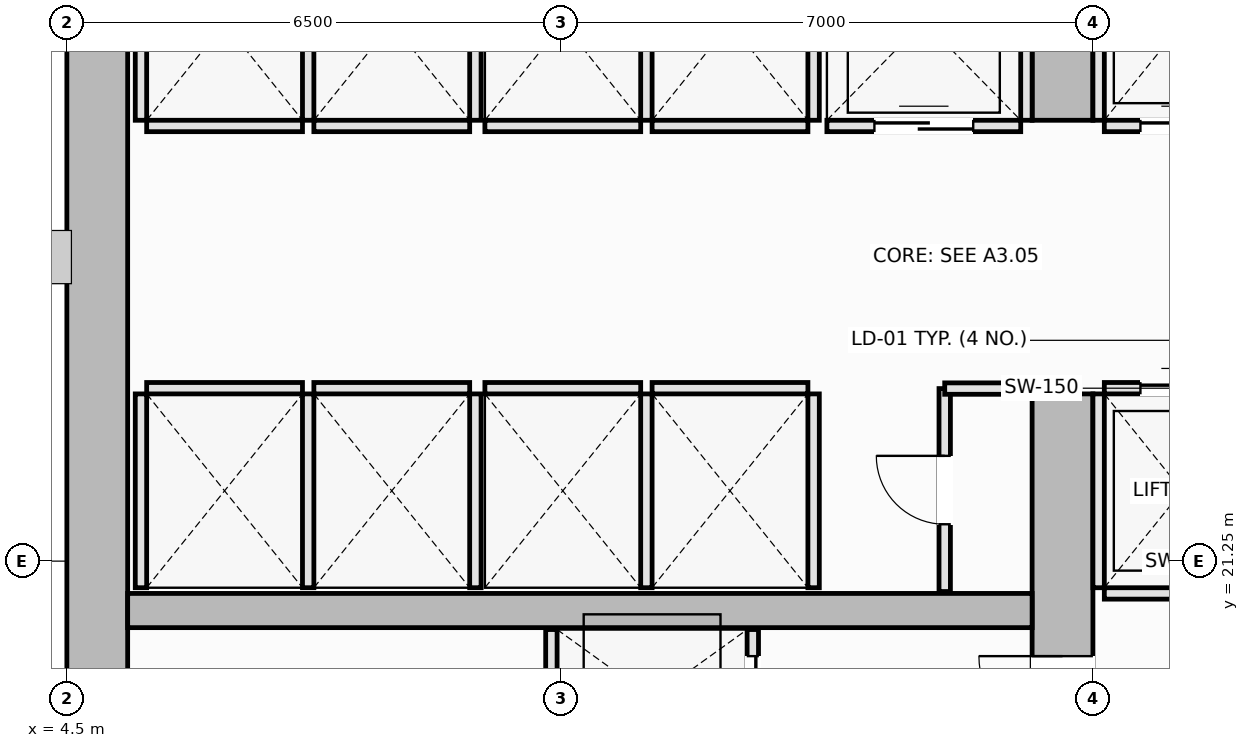
"""IFC4 building model, lengths in metres.
Left out: names, types, materials, properties, quantities, classifications, styles, units other than length and angle.
Written with IfcOpenShell. Run it as: python <this file> out.ifc"""

import sys

from ifc_helpers import new_model, si_unit, direction, frame, frame_2d, origin, place, context, subcontext, project, spatial, rectangle, extrude, element, fill, save


model = new_model("IFC4")
c1 = context("Model", 3, precision=1e-05, world=origin(), true_north=direction((0.0, 1.0)))
c2 = subcontext(c1, "Body", "Model", "MODEL_VIEW")
j1 = project(units=[si_unit("LENGTHUNIT", "METRE"), si_unit("PLANEANGLEUNIT", "RADIAN")], contexts=[c1])
p1 = place(None, origin())
s1 = spatial("IfcSite", under=j1, at=p1, CompositionType="ELEMENT")
p2 = place(p1, origin())
s2 = spatial("IfcBuilding", under=s1, at=p2, CompositionType="ELEMENT")
p3 = place(p2, frame((0.0, 0.0, 54.0)))
s3 = spatial("IfcBuildingStorey", under=s2, at=p3, CompositionType="ELEMENT", Elevation=54.0)
p4 = place(p3, frame((4.9, 14.8, 0.0), z_axis=(0.0, 0.0, 1.0), x_axis=(0.0, 1.0, 0.0)))
e1 = element("IfcWall", 1, at=p4, inside=s3, PredefinedType="SHEAR", context=c2, shape_type="SweptSolid", body=[
    extrude(rectangle(XDim=20.9, YDim=0.8, at=frame_2d((10.45, 0.0))), origin(), (0.0, 0.0, 1.0), 3.55),
])
p5 = place(p3, frame((17.6, 14.8, 0.0), z_axis=(0.0, 0.0, 1.0), x_axis=(0.0, 1.0, 0.0)))
e2 = element("IfcWall", 2, at=p5, inside=s3, PredefinedType="SHEAR", context=c2, shape_type="SweptSolid", body=[
    extrude(rectangle(XDim=8.65, YDim=0.8, at=frame_2d((4.325, 0.0))), origin(), (0.0, 0.0, 1.0), 3.55),
])
p6 = place(p5, frame((4.1, 0.0, 0.0)))
e3 = element("IfcOpeningElement", 3, at=p6, cuts=e2, PredefinedType="OPENING", context=c2, shape_type="SweptSolid", body=[
    extrude(rectangle(XDim=1.1, YDim=2.15, at=frame_2d((0.55, 1.075))), frame((0.0, 0.41, 0.0), z_axis=(0.0, -1.0, 0.0), x_axis=(1.0, 0.0, 0.0)), (0.0, 0.0, 1.0), 0.82),
])
p7 = place(p3, frame((17.6, 27.05, 0.0), z_axis=(0.0, 0.0, 1.0), x_axis=(0.0, 1.0, 0.0)))
e4 = element("IfcWall", 4, at=p7, inside=s3, PredefinedType="SHEAR", context=c2, shape_type="SweptSolid", body=[
    extrude(rectangle(XDim=8.65, YDim=0.8, at=frame_2d((4.325, 0.0))), origin(), (0.0, 0.0, 1.0), 3.55),
])
p8 = place(p7, frame((3.45, 0.0, 0.0)))
e5 = element("IfcOpeningElement", 5, at=p8, cuts=e4, PredefinedType="OPENING", context=c2, shape_type="SweptSolid", body=[
    extrude(rectangle(XDim=1.1, YDim=2.15, at=frame_2d((0.55, 1.075))), frame((0.0, 0.41, 0.0), z_axis=(0.0, -1.0, 0.0), x_axis=(1.0, 0.0, 0.0)), (0.0, 0.0, 1.0), 0.82),
])
p9 = place(p3, frame((5.3, 20.6, 0.0), z_axis=(0.0, 0.0, 1.0), x_axis=(1.0, 0.0, 0.0)))
e6 = element("IfcWall", 6, at=p9, inside=s3, PredefinedType="SHEAR", context=c2, shape_type="SweptSolid", body=[
    extrude(rectangle(XDim=11.9, YDim=0.45, at=frame_2d((5.95, 0.0))), origin(), (0.0, 0.0, 1.0), 3.55),
])
p10 = place(p3, frame((18.15, 20.825, 0.0), z_axis=(0.0, 0.0, 1.0), x_axis=(1.0, 0.0, 0.0)))
e7 = element("IfcWall", 7, at=p10, inside=s3, PredefinedType="PARTITIONING", context=c2, shape_type="SweptSolid", body=[
    extrude(rectangle(XDim=2.05, YDim=0.15, at=frame_2d((1.025, 0.0))), origin(), (0.0, 0.0, 1.0), 3.37),
])
p11 = place(p3, frame((18.15, 23.525, 0.0), z_axis=(0.0, 0.0, 1.0), x_axis=(1.0, 0.0, 0.0)))
e8 = element("IfcWall", 8, at=p11, inside=s3, PredefinedType="PARTITIONING", context=c2, shape_type="SweptSolid", body=[
    extrude(rectangle(XDim=2.05, YDim=0.15, at=frame_2d((1.025, 0.0))), origin(), (0.0, 0.0, 1.0), 3.37),
])
p12 = place(p11, frame((0.475, 0.0, 0.0)))
e9 = element("IfcOpeningElement", 9, at=p12, cuts=e8, PredefinedType="OPENING", context=c2, shape_type="SweptSolid", body=[
    extrude(rectangle(XDim=1.1, YDim=2.2, at=frame_2d((0.55, 1.1))), frame((0.0, 0.085, 0.0), z_axis=(0.0, -1.0, 0.0), x_axis=(1.0, 0.0, 0.0)), (0.0, 0.0, 1.0), 0.17),
])
p13 = place(p3, frame((18.075, 20.9, 0.0), z_axis=(0.0, 0.0, 1.0), x_axis=(0.0, 1.0, 0.0)))
e10 = element("IfcWall", 10, at=p13, inside=s3, PredefinedType="PARTITIONING", context=c2, shape_type="SweptSolid", body=[
    extrude(rectangle(XDim=2.55, YDim=0.15, at=frame_2d((1.275, 0.0))), origin(), (0.0, 0.0, 1.0), 3.37),
])
p14 = place(p3, frame((18.15, 26.975, 0.0), z_axis=(0.0, 0.0, 1.0), x_axis=(1.0, 0.0, 0.0)))
e11 = element("IfcWall", 11, at=p14, inside=s3, PredefinedType="PARTITIONING", context=c2, shape_type="SweptSolid", body=[
    extrude(rectangle(XDim=2.05, YDim=0.15, at=frame_2d((1.025, 0.0))), origin(), (0.0, 0.0, 1.0), 3.37),
])
p15 = place(p14, frame((0.475, 0.0, 0.0)))
e12 = element("IfcOpeningElement", 12, at=p15, cuts=e11, PredefinedType="OPENING", context=c2, shape_type="SweptSolid", body=[
    extrude(rectangle(XDim=1.1, YDim=2.2, at=frame_2d((0.55, 1.1))), frame((0.0, 0.085, 0.0), z_axis=(0.0, -1.0, 0.0), x_axis=(1.0, 0.0, 0.0)), (0.0, 0.0, 1.0), 0.17),
])
p16 = place(p3, frame((18.075, 27.05, 0.0), z_axis=(0.0, 0.0, 1.0), x_axis=(0.0, 1.0, 0.0)))
e13 = element("IfcWall", 13, at=p16, inside=s3, PredefinedType="PARTITIONING", context=c2, shape_type="SweptSolid", body=[
    extrude(rectangle(XDim=2.55, YDim=0.15, at=frame_2d((1.275, 0.0))), origin(), (0.0, 0.0, 1.0), 3.37),
])
p17 = place(p3, frame((5.55, 23.525, 0.0), z_axis=(0.0, 0.0, 1.0), x_axis=(1.0, 0.0, 0.0)))
e14 = element("IfcWall", 14, at=p17, inside=s3, PredefinedType="PARTITIONING", context=c2, shape_type="SweptSolid", body=[
    extrude(rectangle(XDim=2.05, YDim=0.15, at=frame_2d((1.025, 0.0))), origin(), (0.0, 0.0, 1.0), 3.37),
])
for number, where, z_axis, x_axis in (
    (15, (5.475, 20.9, 0.0), (0.0, 0.0, 1.0), (0.0, 1.0, 0.0)),
    (16, (7.675, 20.9, 0.0), (0.0, 0.0, 1.0), (0.0, 1.0, 0.0)),
):
    element("IfcWall", number, at=place(p3, frame(where, z_axis=z_axis, x_axis=x_axis)), inside=s3, PredefinedType="PARTITIONING", context=c2, shape_type="SweptSolid", body=[
        extrude(rectangle(XDim=2.55, YDim=0.15, at=frame_2d((1.275, 0.0))), origin(), (0.0, 0.0, 1.0), 3.37),
    ])
p18 = place(p3, frame((7.75, 23.525, 0.0), z_axis=(0.0, 0.0, 1.0), x_axis=(1.0, 0.0, 0.0)))
e17 = element("IfcWall", 17, at=p18, inside=s3, PredefinedType="PARTITIONING", context=c2, shape_type="SweptSolid", body=[
    extrude(rectangle(XDim=2.05, YDim=0.15, at=frame_2d((1.025, 0.0))), origin(), (0.0, 0.0, 1.0), 3.37),
])
p19 = place(p3, frame((9.875, 20.9, 0.0), z_axis=(0.0, 0.0, 1.0), x_axis=(0.0, 1.0, 0.0)))
e18 = element("IfcWall", 18, at=p19, inside=s3, PredefinedType="PARTITIONING", context=c2, shape_type="SweptSolid", body=[
    extrude(rectangle(XDim=2.55, YDim=0.15, at=frame_2d((1.275, 0.0))), origin(), (0.0, 0.0, 1.0), 3.37),
])
p20 = place(p3, frame((5.55, 26.975, 0.0), z_axis=(0.0, 0.0, 1.0), x_axis=(1.0, 0.0, 0.0)))
e19 = element("IfcWall", 19, at=p20, inside=s3, PredefinedType="PARTITIONING", context=c2, shape_type="SweptSolid", body=[
    extrude(rectangle(XDim=2.05, YDim=0.15, at=frame_2d((1.025, 0.0))), origin(), (0.0, 0.0, 1.0), 3.37),
])
for number, where, z_axis, x_axis in (
    (20, (5.475, 27.05, 0.0), (0.0, 0.0, 1.0), (0.0, 1.0, 0.0)),
    (21, (7.675, 27.05, 0.0), (0.0, 0.0, 1.0), (0.0, 1.0, 0.0)),
):
    element("IfcWall", number, at=place(p3, frame(where, z_axis=z_axis, x_axis=x_axis)), inside=s3, PredefinedType="PARTITIONING", context=c2, shape_type="SweptSolid", body=[
        extrude(rectangle(XDim=2.55, YDim=0.15, at=frame_2d((1.275, 0.0))), origin(), (0.0, 0.0, 1.0), 3.37),
    ])
p21 = place(p3, frame((7.75, 26.975, 0.0), z_axis=(0.0, 0.0, 1.0), x_axis=(1.0, 0.0, 0.0)))
e22 = element("IfcWall", 22, at=p21, inside=s3, PredefinedType="PARTITIONING", context=c2, shape_type="SweptSolid", body=[
    extrude(rectangle(XDim=2.05, YDim=0.15, at=frame_2d((1.025, 0.0))), origin(), (0.0, 0.0, 1.0), 3.37),
])
p22 = place(p3, frame((9.875, 27.05, 0.0), z_axis=(0.0, 0.0, 1.0), x_axis=(0.0, 1.0, 0.0)))
e23 = element("IfcWall", 23, at=p22, inside=s3, PredefinedType="PARTITIONING", context=c2, shape_type="SweptSolid", body=[
    extrude(rectangle(XDim=2.55, YDim=0.15, at=frame_2d((1.275, 0.0))), origin(), (0.0, 0.0, 1.0), 3.37),
])
p23 = place(p3, frame((10.0, 23.525, 0.0), z_axis=(0.0, 0.0, 1.0), x_axis=(1.0, 0.0, 0.0)))
e24 = element("IfcWall", 24, at=p23, inside=s3, PredefinedType="PARTITIONING", context=c2, shape_type="SweptSolid", body=[
    extrude(rectangle(XDim=2.05, YDim=0.15, at=frame_2d((1.025, 0.0))), origin(), (0.0, 0.0, 1.0), 3.37),
])
p24 = place(p3, frame((12.125, 20.9, 0.0), z_axis=(0.0, 0.0, 1.0), x_axis=(0.0, 1.0, 0.0)))
e25 = element("IfcWall", 25, at=p24, inside=s3, PredefinedType="PARTITIONING", context=c2, shape_type="SweptSolid", body=[
    extrude(rectangle(XDim=2.55, YDim=0.15, at=frame_2d((1.275, 0.0))), origin(), (0.0, 0.0, 1.0), 3.37),
])
p25 = place(p3, frame((12.2, 23.525, 0.0), z_axis=(0.0, 0.0, 1.0), x_axis=(1.0, 0.0, 0.0)))
e26 = element("IfcWall", 26, at=p25, inside=s3, PredefinedType="PARTITIONING", context=c2, shape_type="SweptSolid", body=[
    extrude(rectangle(XDim=2.05, YDim=0.15, at=frame_2d((1.025, 0.0))), origin(), (0.0, 0.0, 1.0), 3.37),
])
p26 = place(p3, frame((14.325, 20.9, 0.0), z_axis=(0.0, 0.0, 1.0), x_axis=(0.0, 1.0, 0.0)))
e27 = element("IfcWall", 27, at=p26, inside=s3, PredefinedType="PARTITIONING", context=c2, shape_type="SweptSolid", body=[
    extrude(rectangle(XDim=2.55, YDim=0.15, at=frame_2d((1.275, 0.0))), origin(), (0.0, 0.0, 1.0), 3.37),
])
p27 = place(p3, frame((10.0, 26.975, 0.0), z_axis=(0.0, 0.0, 1.0), x_axis=(1.0, 0.0, 0.0)))
e28 = element("IfcWall", 28, at=p27, inside=s3, PredefinedType="PARTITIONING", context=c2, shape_type="SweptSolid", body=[
    extrude(rectangle(XDim=2.05, YDim=0.15, at=frame_2d((1.025, 0.0))), origin(), (0.0, 0.0, 1.0), 3.37),
])
p28 = place(p3, frame((12.125, 27.05, 0.0), z_axis=(0.0, 0.0, 1.0), x_axis=(0.0, 1.0, 0.0)))
e29 = element("IfcWall", 29, at=p28, inside=s3, PredefinedType="PARTITIONING", context=c2, shape_type="SweptSolid", body=[
    extrude(rectangle(XDim=2.55, YDim=0.15, at=frame_2d((1.275, 0.0))), origin(), (0.0, 0.0, 1.0), 3.37),
])
p29 = place(p3, frame((12.2, 26.975, 0.0), z_axis=(0.0, 0.0, 1.0), x_axis=(1.0, 0.0, 0.0)))
e30 = element("IfcWall", 30, at=p29, inside=s3, PredefinedType="PARTITIONING", context=c2, shape_type="SweptSolid", body=[
    extrude(rectangle(XDim=2.05, YDim=0.15, at=frame_2d((1.025, 0.0))), origin(), (0.0, 0.0, 1.0), 3.37),
])
p30 = place(p3, frame((14.325, 27.05, 0.0), z_axis=(0.0, 0.0, 1.0), x_axis=(0.0, 1.0, 0.0)))
e31 = element("IfcWall", 31, at=p30, inside=s3, PredefinedType="PARTITIONING", context=c2, shape_type="SweptSolid", body=[
    extrude(rectangle(XDim=2.55, YDim=0.15, at=frame_2d((1.275, 0.0))), origin(), (0.0, 0.0, 1.0), 3.37),
])
p31 = place(p3, frame((14.5, 26.975, 0.0), z_axis=(0.0, 0.0, 1.0), x_axis=(1.0, 0.0, 0.0)))
e32 = element("IfcWall", 32, at=p31, inside=s3, PredefinedType="PARTITIONING", context=c2, shape_type="SweptSolid", body=[
    extrude(rectangle(XDim=2.55, YDim=0.15, at=frame_2d((1.275, 0.0))), origin(), (0.0, 0.0, 1.0), 3.37),
])
p32 = place(p31, frame((0.625, 0.0, 0.0)))
e33 = element("IfcOpeningElement", 33, at=p32, cuts=e32, PredefinedType="OPENING", context=c2, shape_type="SweptSolid", body=[
    extrude(rectangle(XDim=1.3, YDim=2.2, at=frame_2d((0.65, 1.1))), frame((0.0, 0.085, 0.0), z_axis=(0.0, -1.0, 0.0), x_axis=(1.0, 0.0, 0.0)), (0.0, 0.0, 1.0), 0.17),
])
p33 = place(p3, frame((17.125, 27.05, 0.0), z_axis=(0.0, 0.0, 1.0), x_axis=(0.0, 1.0, 0.0)))
e34 = element("IfcWall", 34, at=p33, inside=s3, PredefinedType="PARTITIONING", context=c2, shape_type="SweptSolid", body=[
    extrude(rectangle(XDim=2.6, YDim=0.15, at=frame_2d((1.3, 0.0))), origin(), (0.0, 0.0, 1.0), 3.37),
])
p34 = place(p3, frame((10.875, 18.55, 0.0), z_axis=(0.0, 0.0, 1.0), x_axis=(0.0, 1.0, 0.0)))
e35 = element("IfcWall", 35, at=p34, inside=s3, PredefinedType="PARTITIONING", context=c2, shape_type="SweptSolid", body=[
    extrude(rectangle(XDim=1.8, YDim=0.15, at=frame_2d((0.9, 0.0))), origin(), (0.0, 0.0, 1.0), 3.37),
])
p35 = place(p3, frame((13.525, 18.55, 0.0), z_axis=(0.0, 0.0, 1.0), x_axis=(0.0, 1.0, 0.0)))
e36 = element("IfcWall", 36, at=p35, inside=s3, PredefinedType="PARTITIONING", context=c2, shape_type="SweptSolid", body=[
    extrude(rectangle(XDim=1.8, YDim=0.15, at=frame_2d((0.9, 0.0))), origin(), (0.0, 0.0, 1.0), 3.37),
])
p36 = place(p35, frame((0.35, 0.0, 0.0)))
e37 = element("IfcOpeningElement", 37, at=p36, cuts=e36, PredefinedType="OPENING", context=c2, shape_type="SweptSolid", body=[
    extrude(rectangle(XDim=1.1, YDim=2.2, at=frame_2d((0.55, 1.1))), frame((0.0, 0.085, 0.0), z_axis=(0.0, -1.0, 0.0), x_axis=(1.0, 0.0, 0.0)), (0.0, 0.0, 1.0), 0.17),
])
p37 = place(p3, frame((16.05, 20.85, 0.0), z_axis=(0.0, 0.0, 1.0), x_axis=(0.0, 1.0, 0.0)))
e38 = element("IfcWall", 38, at=p37, inside=s3, PredefinedType="PARTITIONING", context=c2, shape_type="SweptSolid", body=[
    extrude(rectangle(XDim=2.67, YDim=0.15, at=frame_2d((1.335, 0.0))), origin(), (0.0, 0.0, 1.0), 3.37),
])
p38 = place(p37, frame((0.885, 0.0, 0.0)))
e39 = element("IfcOpeningElement", 39, at=p38, cuts=e38, PredefinedType="OPENING", context=c2, shape_type="SweptSolid", body=[
    extrude(rectangle(XDim=0.9, YDim=2.1, at=frame_2d((0.45, 1.05))), frame((0.0, 0.085, 0.0), z_axis=(0.0, -1.0, 0.0), x_axis=(1.0, 0.0, 0.0)), (0.0, 0.0, 1.0), 0.17),
])
p39 = place(p3, frame((16.05, 23.52, 0.0), z_axis=(0.0, 0.0, 1.0), x_axis=(1.0, 0.0, 0.0)))
e40 = element("IfcWall", 40, at=p39, inside=s3, PredefinedType="PARTITIONING", context=c2, shape_type="SweptSolid", body=[
    extrude(rectangle(XDim=1.17, YDim=0.15, at=frame_2d((0.585, 0.0))), origin(), (0.0, 0.0, 1.0), 3.37),
])
p40 = place(p12, origin())
e41 = element("IfcDoor", 41, at=p40, inside=s3, OperationType="DOUBLE_DOOR_SLIDING", PredefinedType="DOOR", context=c2, shape_type="SweptSolid", body=[
    extrude(rectangle(XDim=1.1, YDim=2.2, at=frame_2d((0.55, 1.1))), frame((0.0, 0.025, 0.0), z_axis=(0.0, -1.0, 0.0), x_axis=(1.0, 0.0, 0.0)), (0.0, 0.0, 1.0), 0.05),
])
fill(e9, e41)
p41 = place(p15, origin())
e42 = element("IfcDoor", 42, at=p41, inside=s3, OperationType="DOUBLE_DOOR_SLIDING", PredefinedType="DOOR", context=c2, shape_type="SweptSolid", body=[
    extrude(rectangle(XDim=1.1, YDim=2.2, at=frame_2d((0.55, 1.1))), frame((0.0, 0.025, 0.0), z_axis=(0.0, -1.0, 0.0), x_axis=(1.0, 0.0, 0.0)), (0.0, 0.0, 1.0), 0.05),
])
fill(e12, e42)
p42 = place(p32, origin())
e43 = element("IfcDoor", 43, at=p42, inside=s3, OperationType="DOUBLE_DOOR_SLIDING", PredefinedType="DOOR", context=c2, shape_type="SweptSolid", body=[
    extrude(rectangle(XDim=1.3, YDim=2.2, at=frame_2d((0.65, 1.1))), frame((0.0, 0.025, 0.0), z_axis=(0.0, -1.0, 0.0), x_axis=(1.0, 0.0, 0.0)), (0.0, 0.0, 1.0), 0.05),
])
fill(e33, e43)
p43 = place(p36, origin())
e44 = element("IfcDoor", 44, at=p43, inside=s3, OperationType="DOUBLE_DOOR_SLIDING", PredefinedType="DOOR", context=c2, shape_type="SweptSolid", body=[
    extrude(rectangle(XDim=1.1, YDim=2.2, at=frame_2d((0.55, 1.1))), frame((0.0, 0.025, 0.0), z_axis=(0.0, -1.0, 0.0), x_axis=(1.0, 0.0, 0.0)), (0.0, 0.0, 1.0), 0.05),
])
fill(e37, e44)
p44 = place(p6, origin())
e45 = element("IfcDoor", 45, at=p44, inside=s3, OperationType="SINGLE_SWING_RIGHT", PredefinedType="DOOR", context=c2, shape_type="SweptSolid", body=[
    extrude(rectangle(XDim=1.1, YDim=2.15, at=frame_2d((0.55, 1.075))), frame((0.0, 0.025, 0.0), z_axis=(0.0, -1.0, 0.0), x_axis=(1.0, 0.0, 0.0)), (0.0, 0.0, 1.0), 0.05),
])
fill(e3, e45)
p45 = place(p38, origin())
e46 = element("IfcDoor", 46, at=p45, inside=s3, OperationType="SINGLE_SWING_RIGHT", PredefinedType="DOOR", context=c2, shape_type="SweptSolid", body=[
    extrude(rectangle(XDim=0.9, YDim=2.1, at=frame_2d((0.45, 1.05))), frame((0.0, 0.025, 0.0), z_axis=(0.0, -1.0, 0.0), x_axis=(1.0, 0.0, 0.0)), (0.0, 0.0, 1.0), 0.05),
])
fill(e39, e46)
save(model, sys.argv[1])
